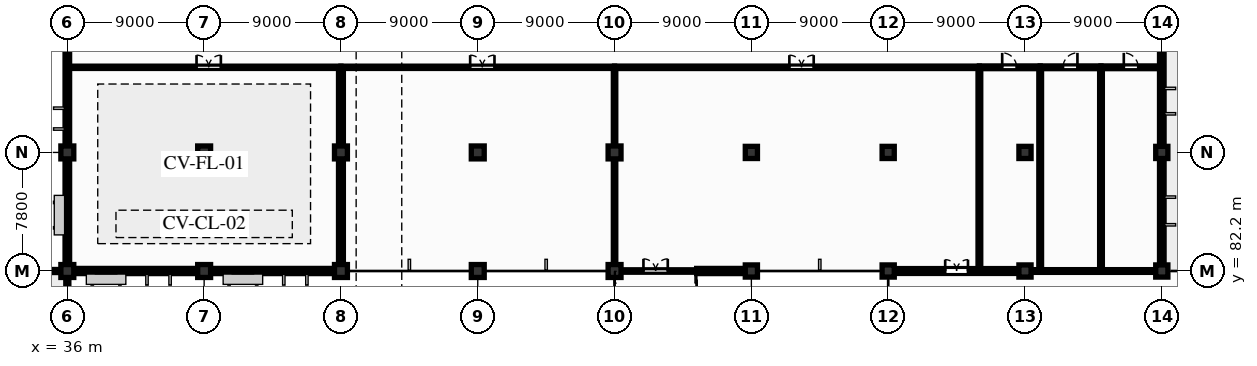
"""IFC4 building model, lengths in metres.
Left out: names, types, materials, properties, quantities, classifications, styles, units other than length and angle.
Written with IfcOpenShell. Run it as: python <this file> out.ifc"""

import sys

from ifc_helpers import new_model, si_unit, direction, frame, frame_2d, origin, origin_2d, place, context, subcontext, project, spatial, rectangle, extrude, element, fill, save


model = new_model("IFC4")
c1 = context("Model", 3, precision=1e-05, world=origin(), true_north=direction((0.0, 1.0)))
c2 = subcontext(c1, "Body", "Model", "MODEL_VIEW")
j1 = project(units=[si_unit("LENGTHUNIT", "METRE"), si_unit("PLANEANGLEUNIT", "RADIAN")], contexts=[c1])
p1 = place(None, origin())
s1 = spatial("IfcSite", under=j1, at=p1, CompositionType="ELEMENT")
p2 = place(p1, origin())
s2 = spatial("IfcBuilding", under=s1, at=p2, CompositionType="ELEMENT")
p3 = place(p2, frame((0.0, 0.0, 5.1)))
s3 = spatial("IfcBuildingStorey", under=s2, at=p3, CompositionType="ELEMENT", Elevation=5.1)
for number, where, z_axis, x_axis in (
    (1, (36.0, 82.2, 0.0), (0.0, 0.0, 1.0), (1.0, 0.0, 0.0)),
    (2, (36.0, 90.0, 0.0), (0.0, 0.0, 1.0), (1.0, 0.0, 0.0)),
    (3, (45.0, 82.2, 0.0), (0.0, 0.0, 1.0), (1.0, 0.0, 0.0)),
    (4, (45.0, 90.0, 0.0), (0.0, 0.0, 1.0), (1.0, 0.0, 0.0)),
    (5, (54.0, 82.2, 0.0), (0.0, 0.0, 1.0), (1.0, 0.0, 0.0)),
    (6, (54.0, 90.0, 0.0), (0.0, 0.0, 1.0), (1.0, 0.0, 0.0)),
    (7, (63.0, 82.2, 0.0), (0.0, 0.0, 1.0), (1.0, 0.0, 0.0)),
    (8, (63.0, 90.0, 0.0), (0.0, 0.0, 1.0), (1.0, 0.0, 0.0)),
    (9, (72.0, 82.2, 0.0), (0.0, 0.0, 1.0), (1.0, 0.0, 0.0)),
    (10, (72.0, 90.0, 0.0), (0.0, 0.0, 1.0), (1.0, 0.0, 0.0)),
):
    element("IfcColumn", number, at=place(p3, frame(where, z_axis=z_axis, x_axis=x_axis)), inside=s3, PredefinedType="COLUMN", context=c2, shape_type="SweptSolid", body=[
        extrude(rectangle(XDim=0.85, YDim=0.85, at=origin_2d()), origin(), (0.0, 0.0, 1.0), 3.84),
    ])
for number, where, z_axis, x_axis in (
    (11, (81.0, 82.2, 0.0), (0.0, 0.0, 1.0), (1.0, 0.0, 0.0)),
    (12, (81.0, 90.0, 0.0), (0.0, 0.0, 1.0), (1.0, 0.0, 0.0)),
    (13, (90.0, 82.2, 0.0), (0.0, 0.0, 1.0), (1.0, 0.0, 0.0)),
    (14, (90.0, 90.0, 0.0), (0.0, 0.0, 1.0), (1.0, 0.0, 0.0)),
    (15, (99.0, 82.2, 0.0), (0.0, 0.0, 1.0), (1.0, 0.0, 0.0)),
    (16, (99.0, 90.0, 0.0), (0.0, 0.0, 1.0), (1.0, 0.0, 0.0)),
    (17, (108.0, 82.2, 0.0), (0.0, 0.0, 1.0), (1.0, 0.0, 0.0)),
    (18, (108.0, 90.0, 0.0), (0.0, 0.0, 1.0), (1.0, 0.0, 0.0)),
):
    element("IfcColumn", number, at=place(p3, frame(where, z_axis=z_axis, x_axis=x_axis)), inside=s3, PredefinedType="COLUMN", context=c2, shape_type="SweptSolid", body=[
        extrude(rectangle(XDim=0.8, YDim=0.8, at=origin_2d()), origin(), (0.0, 0.0, 1.0), 3.84),
    ])
p4 = place(p3, frame((36.0, 82.2, 0.0), z_axis=(0.0, 0.0, 1.0), x_axis=(1.0, 0.0, 0.0)))
e19 = element("IfcWall", 19, at=p4, inside=s3, PredefinedType="SOLIDWALL", context=c2, shape_type="SweptSolid", body=[
    extrude(rectangle(XDim=9.0, YDim=0.34, at=frame_2d((4.5, 0.0))), origin(), (0.0, 0.0, 1.0), 3.55),
])
p5 = place(p4, frame((1.8, 0.0, 0.715)))
e20 = element("IfcOpeningElement", 20, at=p5, cuts=e19, PredefinedType="OPENING", context=c2, shape_type="SweptSolid", body=[
    extrude(rectangle(XDim=1.5, YDim=2.1, at=frame_2d((0.75, 1.05))), frame((0.0, 0.18, 0.0), z_axis=(0.0, -1.0, 0.0), x_axis=(1.0, 0.0, 0.0)), (0.0, 0.0, 1.0), 0.36),
])
p6 = place(p4, frame((5.4, 0.0, 0.715)))
e21 = element("IfcOpeningElement", 21, at=p6, cuts=e19, PredefinedType="OPENING", context=c2, shape_type="SweptSolid", body=[
    extrude(rectangle(XDim=1.2, YDim=2.1, at=frame_2d((0.6, 1.05))), frame((0.0, 0.18, 0.0), z_axis=(0.0, -1.0, 0.0), x_axis=(1.0, 0.0, 0.0)), (0.0, 0.0, 1.0), 0.36),
])
p7 = place(p3, frame((45.0, 82.2, 0.0), z_axis=(0.0, 0.0, 1.0), x_axis=(1.0, 0.0, 0.0)))
e22 = element("IfcWall", 22, at=p7, inside=s3, PredefinedType="SOLIDWALL", context=c2, shape_type="SweptSolid", body=[
    extrude(rectangle(XDim=9.0, YDim=0.34, at=frame_2d((4.5, 0.0))), origin(), (0.0, 0.0, 1.0), 3.55),
])
p8 = place(p7, frame((1.8, 0.0, 0.715)))
e23 = element("IfcOpeningElement", 23, at=p8, cuts=e22, PredefinedType="OPENING", context=c2, shape_type="SweptSolid", body=[
    extrude(rectangle(XDim=1.5, YDim=2.1, at=frame_2d((0.75, 1.05))), frame((0.0, 0.18, 0.0), z_axis=(0.0, -1.0, 0.0), x_axis=(1.0, 0.0, 0.0)), (0.0, 0.0, 1.0), 0.36),
])
p9 = place(p7, frame((5.4, 0.0, 0.715)))
e24 = element("IfcOpeningElement", 24, at=p9, cuts=e22, PredefinedType="OPENING", context=c2, shape_type="SweptSolid", body=[
    extrude(rectangle(XDim=1.2, YDim=2.1, at=frame_2d((0.6, 1.05))), frame((0.0, 0.18, 0.0), z_axis=(0.0, -1.0, 0.0), x_axis=(1.0, 0.0, 0.0)), (0.0, 0.0, 1.0), 0.36),
])
p10 = place(p3, frame((77.4, 82.2, 0.0), z_axis=(0.0, 0.0, 1.0), x_axis=(1.0, 0.0, 0.0)))
e25 = element("IfcWall", 25, at=p10, inside=s3, PredefinedType="SOLIDWALL", context=c2, shape_type="SweptSolid", body=[
    extrude(rectangle(XDim=3.6, YDim=0.34, at=frame_2d((1.8, 0.0))), origin(), (0.0, 0.0, 1.0), 3.55),
])
p11 = place(p3, frame((36.0, 82.2, 0.0), z_axis=(0.0, 0.0, 1.0), x_axis=(0.0, 1.0, 0.0)))
e26 = element("IfcWall", 26, at=p11, inside=s3, PredefinedType="SOLIDWALL", context=c2, shape_type="SweptSolid", body=[
    extrude(rectangle(XDim=31.8, YDim=0.3, at=frame_2d((15.9, 0.0))), origin(), (0.0, 0.0, 1.0), 2.855),
])
p12 = place(p11, frame((3.0, 0.0, 0.885)))
e27 = element("IfcOpeningElement", 27, at=p12, cuts=e26, PredefinedType="OPENING", context=c2, shape_type="SweptSolid", body=[
    extrude(rectangle(XDim=1.35, YDim=1.85, at=frame_2d((0.675, 0.925))), frame((0.0, 0.16, 0.0), z_axis=(0.0, -1.0, 0.0), x_axis=(1.0, 0.0, 0.0)), (0.0, 0.0, 1.0), 0.32),
])
p13 = place(p11, frame((9.5, 0.0, 0.95)))
e28 = element("IfcOpeningElement", 28, at=p13, cuts=e26, PredefinedType="OPENING", context=c2, shape_type="SweptSolid", body=[
    extrude(rectangle(XDim=1.05, YDim=1.75, at=frame_2d((0.525, 0.875))), frame((0.0, 0.16, 0.0), z_axis=(0.0, -1.0, 0.0), x_axis=(1.0, 0.0, 0.0)), (0.0, 0.0, 1.0), 0.32),
])
p14 = place(p11, frame((16.5, 0.0, 0.635)))
e29 = element("IfcOpeningElement", 29, at=p14, cuts=e26, PredefinedType="OPENING", context=c2, shape_type="SweptSolid", body=[
    extrude(rectangle(XDim=1.5, YDim=2.1, at=frame_2d((0.75, 1.05))), frame((0.0, 0.16, 0.0), z_axis=(0.0, -1.0, 0.0), x_axis=(1.0, 0.0, 0.0)), (0.0, 0.0, 1.0), 0.32),
])
p15 = place(p3, frame((108.0, 82.2, 0.0), z_axis=(0.0, 0.0, 1.0), x_axis=(0.0, 1.0, 0.0)))
e30 = element("IfcWall", 30, at=p15, inside=s3, PredefinedType="SOLIDWALL", context=c2, shape_type="SweptSolid", body=[
    extrude(rectangle(XDim=31.8, YDim=0.3, at=frame_2d((15.9, 0.0))), origin(), (0.0, 0.0, 1.0), 2.815),
])
p16 = place(p15, frame((3.2, 0.0, 0.595)))
e31 = element("IfcOpeningElement", 31, at=p16, cuts=e30, PredefinedType="OPENING", context=c2, shape_type="SweptSolid", body=[
    extrude(rectangle(XDim=1.5, YDim=2.1, at=frame_2d((0.75, 1.05))), frame((0.0, 0.16, 0.0), z_axis=(0.0, -1.0, 0.0), x_axis=(1.0, 0.0, 0.0)), (0.0, 0.0, 1.0), 0.32),
])
p17 = place(p15, frame((10.5, 0.0, 0.845)))
e32 = element("IfcOpeningElement", 32, at=p17, cuts=e30, PredefinedType="OPENING", context=c2, shape_type="SweptSolid", body=[
    extrude(rectangle(XDim=1.35, YDim=1.85, at=frame_2d((0.675, 0.925))), frame((0.0, 0.16, 0.0), z_axis=(0.0, -1.0, 0.0), x_axis=(1.0, 0.0, 0.0)), (0.0, 0.0, 1.0), 0.32),
])
p18 = place(p3, frame((36.0, 77.8, 0.0), z_axis=(0.0, 0.0, 1.0), x_axis=(0.0, 1.0, 0.0)))
e33 = element("IfcWall", 33, at=p18, inside=s3, PredefinedType="PARAPET", context=c2, shape_type="SweptSolid", body=[
    extrude(rectangle(XDim=4.2, YDim=0.2, at=frame_2d((2.1, 0.0))), origin(), (0.0, 0.0, 1.0), 0.72),
])
p19 = place(p3, frame((35.8, 82.2, 0.0), z_axis=(0.0, 0.0, 1.0), x_axis=(-1.0, 0.0, 0.0)))
e34 = element("IfcWall", 34, at=p19, inside=s3, PredefinedType="PARAPET", context=c2, shape_type="SweptSolid", body=[
    extrude(rectangle(XDim=35.6, YDim=0.2, at=frame_2d((17.8, 0.0))), origin(), (0.0, 0.0, 1.0), 0.72),
])
p20 = place(p3, frame((90.0, 82.2, 0.0), z_axis=(0.0, 0.0, 1.0), x_axis=(1.0, 0.0, 0.0)))
e35 = element("IfcWall", 35, at=p20, inside=s3, PredefinedType="SHEAR", context=c2, shape_type="SweptSolid", body=[
    extrude(rectangle(XDim=9.0, YDim=0.32, at=frame_2d((4.5, 0.0))), origin(), (0.0, 0.0, 1.0), 3.55),
])
p21 = place(p20, frame((3.75, 0.0, 0.0)))
e36 = element("IfcOpeningElement", 36, at=p21, cuts=e35, PredefinedType="OPENING", context=c2, shape_type="SweptSolid", body=[
    extrude(rectangle(XDim=1.5, YDim=2.2, at=frame_2d((0.75, 1.1))), frame((0.0, 0.17, 0.0), z_axis=(0.0, -1.0, 0.0), x_axis=(1.0, 0.0, 0.0)), (0.0, 0.0, 1.0), 0.34),
])
p22 = place(p3, frame((36.0, 95.6, 0.0), z_axis=(0.0, 0.0, 1.0), x_axis=(1.0, 0.0, 0.0)))
e37 = element("IfcWall", 37, at=p22, inside=s3, PredefinedType="PARTITIONING", context=c2, shape_type="SweptSolid", body=[
    extrude(rectangle(XDim=18.0, YDim=0.15, at=frame_2d((9.0, 0.0))), origin(), (0.0, 0.0, 1.0), 2.735),
])
p23 = place(p22, frame((8.5, 0.0, 0.0)))
e38 = element("IfcOpeningElement", 38, at=p23, cuts=e37, PredefinedType="OPENING", context=c2, shape_type="SweptSolid", body=[
    extrude(rectangle(XDim=1.6, YDim=2.2, at=frame_2d((0.8, 1.1))), frame((0.0, 0.085, 0.0), z_axis=(0.0, -1.0, 0.0), x_axis=(1.0, 0.0, 0.0)), (0.0, 0.0, 1.0), 0.17),
])
p24 = place(p3, frame((54.0, 95.6, 0.0), z_axis=(0.0, 0.0, 1.0), x_axis=(1.0, 0.0, 0.0)))
e39 = element("IfcWall", 39, at=p24, inside=s3, PredefinedType="PARTITIONING", context=c2, shape_type="SweptSolid", body=[
    extrude(rectangle(XDim=18.0, YDim=0.15, at=frame_2d((9.0, 0.0))), origin(), (0.0, 0.0, 1.0), 2.735),
])
p25 = place(p24, frame((8.5, 0.0, 0.0)))
e40 = element("IfcOpeningElement", 40, at=p25, cuts=e39, PredefinedType="OPENING", context=c2, shape_type="SweptSolid", body=[
    extrude(rectangle(XDim=1.6, YDim=2.2, at=frame_2d((0.8, 1.1))), frame((0.0, 0.085, 0.0), z_axis=(0.0, -1.0, 0.0), x_axis=(1.0, 0.0, 0.0)), (0.0, 0.0, 1.0), 0.17),
])
p26 = place(p3, frame((54.0, 82.2, 0.0), z_axis=(0.0, 0.0, 1.0), x_axis=(0.0, 1.0, 0.0)))
e41 = element("IfcWall", 41, at=p26, inside=s3, PredefinedType="SHEAR", context=c2, shape_type="SweptSolid", body=[
    extrude(rectangle(XDim=13.4, YDim=0.32, at=frame_2d((6.7, 0.0))), origin(), (0.0, 0.0, 1.0), 3.55),
])
p27 = place(p3, frame((72.0, 95.6, 0.0), z_axis=(0.0, 0.0, 1.0), x_axis=(1.0, 0.0, 0.0)))
e42 = element("IfcWall", 42, at=p27, inside=s3, PredefinedType="PARTITIONING", context=c2, shape_type="SweptSolid", body=[
    extrude(rectangle(XDim=24.0, YDim=0.16, at=frame_2d((12.0, 0.0))), origin(), (0.0, 0.0, 1.0), 3.55),
])
p28 = place(p27, frame((11.5, 0.0, 0.0)))
e43 = element("IfcOpeningElement", 43, at=p28, cuts=e42, PredefinedType="OPENING", context=c2, shape_type="SweptSolid", body=[
    extrude(rectangle(XDim=1.6, YDim=2.2, at=frame_2d((0.8, 1.1))), frame((0.0, 0.09, 0.0), z_axis=(0.0, -1.0, 0.0), x_axis=(1.0, 0.0, 0.0)), (0.0, 0.0, 1.0), 0.18),
])
p29 = place(p3, frame((72.0, 82.2, 0.0), z_axis=(0.0, 0.0, 1.0), x_axis=(0.0, 1.0, 0.0)))
e44 = element("IfcWall", 44, at=p29, inside=s3, PredefinedType="PARTITIONING", context=c2, shape_type="SweptSolid", body=[
    extrude(rectangle(XDim=13.4, YDim=0.16, at=frame_2d((6.7, 0.0))), origin(), (0.0, 0.0, 1.0), 2.855),
])
p30 = place(p3, frame((96.0, 95.6, 0.0), z_axis=(0.0, 0.0, 1.0), x_axis=(1.0, 0.0, 0.0)))
e45 = element("IfcWall", 45, at=p30, inside=s3, PredefinedType="PLUMBINGWALL", context=c2, shape_type="SweptSolid", body=[
    extrude(rectangle(XDim=4.0, YDim=0.18, at=frame_2d((2.0, 0.0))), origin(), (0.0, 0.0, 1.0), 3.55),
])
p31 = place(p30, frame((1.5, 0.0, 0.0)))
e46 = element("IfcOpeningElement", 46, at=p31, cuts=e45, PredefinedType="OPENING", context=c2, shape_type="SweptSolid", body=[
    extrude(rectangle(XDim=0.95, YDim=2.15, at=frame_2d((0.475, 1.075))), frame((0.0, 0.1, 0.0), z_axis=(0.0, -1.0, 0.0), x_axis=(1.0, 0.0, 0.0)), (0.0, 0.0, 1.0), 0.2),
])
p32 = place(p3, frame((96.0, 82.2, 0.0), z_axis=(0.0, 0.0, 1.0), x_axis=(0.0, 1.0, 0.0)))
e47 = element("IfcWall", 47, at=p32, inside=s3, PredefinedType="PLUMBINGWALL", context=c2, shape_type="SweptSolid", body=[
    extrude(rectangle(XDim=13.4, YDim=0.18, at=frame_2d((6.7, 0.0))), origin(), (0.0, 0.0, 1.0), 3.55),
])
p33 = place(p3, frame((100.0, 95.6, 0.0), z_axis=(0.0, 0.0, 1.0), x_axis=(1.0, 0.0, 0.0)))
e48 = element("IfcWall", 48, at=p33, inside=s3, PredefinedType="PLUMBINGWALL", context=c2, shape_type="SweptSolid", body=[
    extrude(rectangle(XDim=4.0, YDim=0.18, at=frame_2d((2.0, 0.0))), origin(), (0.0, 0.0, 1.0), 3.55),
])
p34 = place(p33, frame((1.5, 0.0, 0.0)))
e49 = element("IfcOpeningElement", 49, at=p34, cuts=e48, PredefinedType="OPENING", context=c2, shape_type="SweptSolid", body=[
    extrude(rectangle(XDim=0.95, YDim=2.15, at=frame_2d((0.475, 1.075))), frame((0.0, 0.1, 0.0), z_axis=(0.0, -1.0, 0.0), x_axis=(1.0, 0.0, 0.0)), (0.0, 0.0, 1.0), 0.2),
])
p35 = place(p3, frame((100.0, 82.2, 0.0), z_axis=(0.0, 0.0, 1.0), x_axis=(0.0, 1.0, 0.0)))
e50 = element("IfcWall", 50, at=p35, inside=s3, PredefinedType="PLUMBINGWALL", context=c2, shape_type="SweptSolid", body=[
    extrude(rectangle(XDim=13.4, YDim=0.18, at=frame_2d((6.7, 0.0))), origin(), (0.0, 0.0, 1.0), 3.55),
])
p36 = place(p3, frame((104.0, 95.6, 0.0), z_axis=(0.0, 0.0, 1.0), x_axis=(1.0, 0.0, 0.0)))
e51 = element("IfcWall", 51, at=p36, inside=s3, PredefinedType="PLUMBINGWALL", context=c2, shape_type="SweptSolid", body=[
    extrude(rectangle(XDim=4.0, YDim=0.18, at=frame_2d((2.0, 0.0))), origin(), (0.0, 0.0, 1.0), 3.55),
])
p37 = place(p36, frame((1.5, 0.0, 0.0)))
e52 = element("IfcOpeningElement", 52, at=p37, cuts=e51, PredefinedType="OPENING", context=c2, shape_type="SweptSolid", body=[
    extrude(rectangle(XDim=0.95, YDim=2.15, at=frame_2d((0.475, 1.075))), frame((0.0, 0.1, 0.0), z_axis=(0.0, -1.0, 0.0), x_axis=(1.0, 0.0, 0.0)), (0.0, 0.0, 1.0), 0.2),
])
p38 = place(p3, frame((104.0, 82.2, 0.0), z_axis=(0.0, 0.0, 1.0), x_axis=(0.0, 1.0, 0.0)))
e53 = element("IfcWall", 53, at=p38, inside=s3, PredefinedType="PLUMBINGWALL", context=c2, shape_type="SweptSolid", body=[
    extrude(rectangle(XDim=13.4, YDim=0.18, at=frame_2d((6.7, 0.0))), origin(), (0.0, 0.0, 1.0), 3.55),
])
p39 = place(p3, frame((99.0, 82.2, 0.0), z_axis=(0.0, 0.0, 1.0), x_axis=(1.0, 0.0, 0.0)))
e54 = element("IfcWall", 54, at=p39, inside=s3, PredefinedType="PLUMBINGWALL", context=c2, shape_type="SweptSolid", body=[
    extrude(rectangle(XDim=9.0, YDim=0.18, at=frame_2d((4.5, 0.0))), origin(), (0.0, 0.0, 1.0), 2.873),
])
p40 = place(p3, frame((72.0, 82.2, 0.0), z_axis=(0.0, 0.0, 1.0), x_axis=(1.0, 0.0, 0.0)))
e55 = element("IfcWall", 55, at=p40, inside=s3, PredefinedType="PARTITIONING", context=c2, shape_type="SweptSolid", body=[
    extrude(rectangle(XDim=5.4, YDim=0.16, at=frame_2d((2.7, 0.0))), origin(), (0.0, 0.0, 1.0), 2.855),
])
p41 = place(p40, frame((1.9, 0.0, 0.0)))
e56 = element("IfcOpeningElement", 56, at=p41, cuts=e55, PredefinedType="OPENING", context=c2, shape_type="SweptSolid", body=[
    extrude(rectangle(XDim=1.6, YDim=2.2, at=frame_2d((0.8, 1.1))), frame((0.0, 0.09, 0.0), z_axis=(0.0, -1.0, 0.0), x_axis=(1.0, 0.0, 0.0)), (0.0, 0.0, 1.0), 0.18),
])
p42 = place(p5, origin())
e57 = element("IfcWindow", 57, at=p42, inside=s3, PartitioningType="SINGLE_PANEL", PredefinedType="WINDOW", context=c2, shape_type="SweptSolid", body=[
    extrude(rectangle(XDim=1.5, YDim=2.1, at=frame_2d((0.75, 1.05))), frame((0.0, 0.03, 0.0), z_axis=(0.0, -1.0, 0.0), x_axis=(1.0, 0.0, 0.0)), (0.0, 0.0, 1.0), 0.06),
])
fill(e20, e57)
p43 = place(p6, origin())
e58 = element("IfcWindow", 58, at=p43, inside=s3, PartitioningType="SINGLE_PANEL", PredefinedType="WINDOW", context=c2, shape_type="SweptSolid", body=[
    extrude(rectangle(XDim=1.2, YDim=2.1, at=frame_2d((0.6, 1.05))), frame((0.0, 0.03, 0.0), z_axis=(0.0, -1.0, 0.0), x_axis=(1.0, 0.0, 0.0)), (0.0, 0.0, 1.0), 0.06),
])
fill(e21, e58)
p44 = place(p8, origin())
e59 = element("IfcWindow", 59, at=p44, inside=s3, PartitioningType="SINGLE_PANEL", PredefinedType="WINDOW", context=c2, shape_type="SweptSolid", body=[
    extrude(rectangle(XDim=1.5, YDim=2.1, at=frame_2d((0.75, 1.05))), frame((0.0, 0.03, 0.0), z_axis=(0.0, -1.0, 0.0), x_axis=(1.0, 0.0, 0.0)), (0.0, 0.0, 1.0), 0.06),
])
fill(e23, e59)
p45 = place(p9, origin())
e60 = element("IfcWindow", 60, at=p45, inside=s3, PartitioningType="SINGLE_PANEL", PredefinedType="WINDOW", context=c2, shape_type="SweptSolid", body=[
    extrude(rectangle(XDim=1.2, YDim=2.1, at=frame_2d((0.6, 1.05))), frame((0.0, 0.03, 0.0), z_axis=(0.0, -1.0, 0.0), x_axis=(1.0, 0.0, 0.0)), (0.0, 0.0, 1.0), 0.06),
])
fill(e24, e60)
p46 = place(p12, origin())
e61 = element("IfcWindow", 61, at=p46, inside=s3, PartitioningType="SINGLE_PANEL", PredefinedType="WINDOW", context=c2, shape_type="SweptSolid", body=[
    extrude(rectangle(XDim=1.35, YDim=1.85, at=frame_2d((0.675, 0.925))), frame((0.0, 0.03, 0.0), z_axis=(0.0, -1.0, 0.0), x_axis=(1.0, 0.0, 0.0)), (0.0, 0.0, 1.0), 0.06),
])
fill(e27, e61)
p47 = place(p13, origin())
e62 = element("IfcWindow", 62, at=p47, inside=s3, PartitioningType="SINGLE_PANEL", PredefinedType="WINDOW", context=c2, shape_type="SweptSolid", body=[
    extrude(rectangle(XDim=1.05, YDim=1.75, at=frame_2d((0.525, 0.875))), frame((0.0, 0.03, 0.0), z_axis=(0.0, -1.0, 0.0), x_axis=(1.0, 0.0, 0.0)), (0.0, 0.0, 1.0), 0.06),
])
fill(e28, e62)
p48 = place(p16, origin())
e63 = element("IfcWindow", 63, at=p48, inside=s3, PartitioningType="SINGLE_PANEL", PredefinedType="WINDOW", context=c2, shape_type="SweptSolid", body=[
    extrude(rectangle(XDim=1.5, YDim=2.1, at=frame_2d((0.75, 1.05))), frame((0.0, 0.03, 0.0), z_axis=(0.0, -1.0, 0.0), x_axis=(1.0, 0.0, 0.0)), (0.0, 0.0, 1.0), 0.06),
])
fill(e31, e63)
p49 = place(p17, origin())
e64 = element("IfcWindow", 64, at=p49, inside=s3, PartitioningType="SINGLE_PANEL", PredefinedType="WINDOW", context=c2, shape_type="SweptSolid", body=[
    extrude(rectangle(XDim=1.35, YDim=1.85, at=frame_2d((0.675, 0.925))), frame((0.0, 0.03, 0.0), z_axis=(0.0, -1.0, 0.0), x_axis=(1.0, 0.0, 0.0)), (0.0, 0.0, 1.0), 0.06),
])
fill(e32, e64)
p50 = place(p21, origin())
e65 = element("IfcDoor", 65, at=p50, inside=s3, OperationType="DOUBLE_DOOR_SINGLE_SWING", PredefinedType="DOOR", context=c2, shape_type="SweptSolid", body=[
    extrude(rectangle(XDim=1.5, YDim=2.2, at=frame_2d((0.75, 1.1))), frame((0.0, 0.025, 0.0), z_axis=(0.0, -1.0, 0.0), x_axis=(1.0, 0.0, 0.0)), (0.0, 0.0, 1.0), 0.05),
])
fill(e36, e65)
p51 = place(p23, origin())
e66 = element("IfcDoor", 66, at=p51, inside=s3, OperationType="DOUBLE_DOOR_SINGLE_SWING", PredefinedType="DOOR", context=c2, shape_type="SweptSolid", body=[
    extrude(rectangle(XDim=1.6, YDim=2.2, at=frame_2d((0.8, 1.1))), frame((0.0, 0.025, 0.0), z_axis=(0.0, -1.0, 0.0), x_axis=(1.0, 0.0, 0.0)), (0.0, 0.0, 1.0), 0.05),
])
fill(e38, e66)
p52 = place(p25, origin())
e67 = element("IfcDoor", 67, at=p52, inside=s3, OperationType="DOUBLE_DOOR_SINGLE_SWING", PredefinedType="DOOR", context=c2, shape_type="SweptSolid", body=[
    extrude(rectangle(XDim=1.6, YDim=2.2, at=frame_2d((0.8, 1.1))), frame((0.0, 0.025, 0.0), z_axis=(0.0, -1.0, 0.0), x_axis=(1.0, 0.0, 0.0)), (0.0, 0.0, 1.0), 0.05),
])
fill(e40, e67)
p53 = place(p28, origin())
e68 = element("IfcDoor", 68, at=p53, inside=s3, OperationType="DOUBLE_DOOR_SINGLE_SWING", PredefinedType="DOOR", context=c2, shape_type="SweptSolid", body=[
    extrude(rectangle(XDim=1.6, YDim=2.2, at=frame_2d((0.8, 1.1))), frame((0.0, 0.025, 0.0), z_axis=(0.0, -1.0, 0.0), x_axis=(1.0, 0.0, 0.0)), (0.0, 0.0, 1.0), 0.05),
])
fill(e43, e68)
p54 = place(p31, origin())
e69 = element("IfcDoor", 69, at=p54, inside=s3, OperationType="SINGLE_SWING_LEFT", PredefinedType="DOOR", context=c2, shape_type="SweptSolid", body=[
    extrude(rectangle(XDim=0.95, YDim=2.15, at=frame_2d((0.475, 1.075))), frame((0.0, 0.025, 0.0), z_axis=(0.0, -1.0, 0.0), x_axis=(1.0, 0.0, 0.0)), (0.0, 0.0, 1.0), 0.05),
])
fill(e46, e69)
p55 = place(p34, origin())
e70 = element("IfcDoor", 70, at=p55, inside=s3, OperationType="SINGLE_SWING_RIGHT", PredefinedType="DOOR", context=c2, shape_type="SweptSolid", body=[
    extrude(rectangle(XDim=0.95, YDim=2.15, at=frame_2d((0.475, 1.075))), frame((0.0, 0.025, 0.0), z_axis=(0.0, -1.0, 0.0), x_axis=(1.0, 0.0, 0.0)), (0.0, 0.0, 1.0), 0.05),
])
fill(e49, e70)
p56 = place(p37, origin())
e71 = element("IfcDoor", 71, at=p56, inside=s3, OperationType="SINGLE_SWING_LEFT", PredefinedType="DOOR", context=c2, shape_type="SweptSolid", body=[
    extrude(rectangle(XDim=0.95, YDim=2.15, at=frame_2d((0.475, 1.075))), frame((0.0, 0.025, 0.0), z_axis=(0.0, -1.0, 0.0), x_axis=(1.0, 0.0, 0.0)), (0.0, 0.0, 1.0), 0.05),
])
fill(e52, e71)
p57 = place(p41, origin())
e72 = element("IfcDoor", 72, at=p57, inside=s3, OperationType="DOUBLE_DOOR_SINGLE_SWING", PredefinedType="DOOR", context=c2, shape_type="SweptSolid", body=[
    extrude(rectangle(XDim=1.6, YDim=2.2, at=frame_2d((0.8, 1.1))), frame((0.0, 0.025, 0.0), z_axis=(0.0, -1.0, 0.0), x_axis=(1.0, 0.0, 0.0)), (0.0, 0.0, 1.0), 0.05),
])
fill(e56, e72)
save(model, sys.argv[1])
